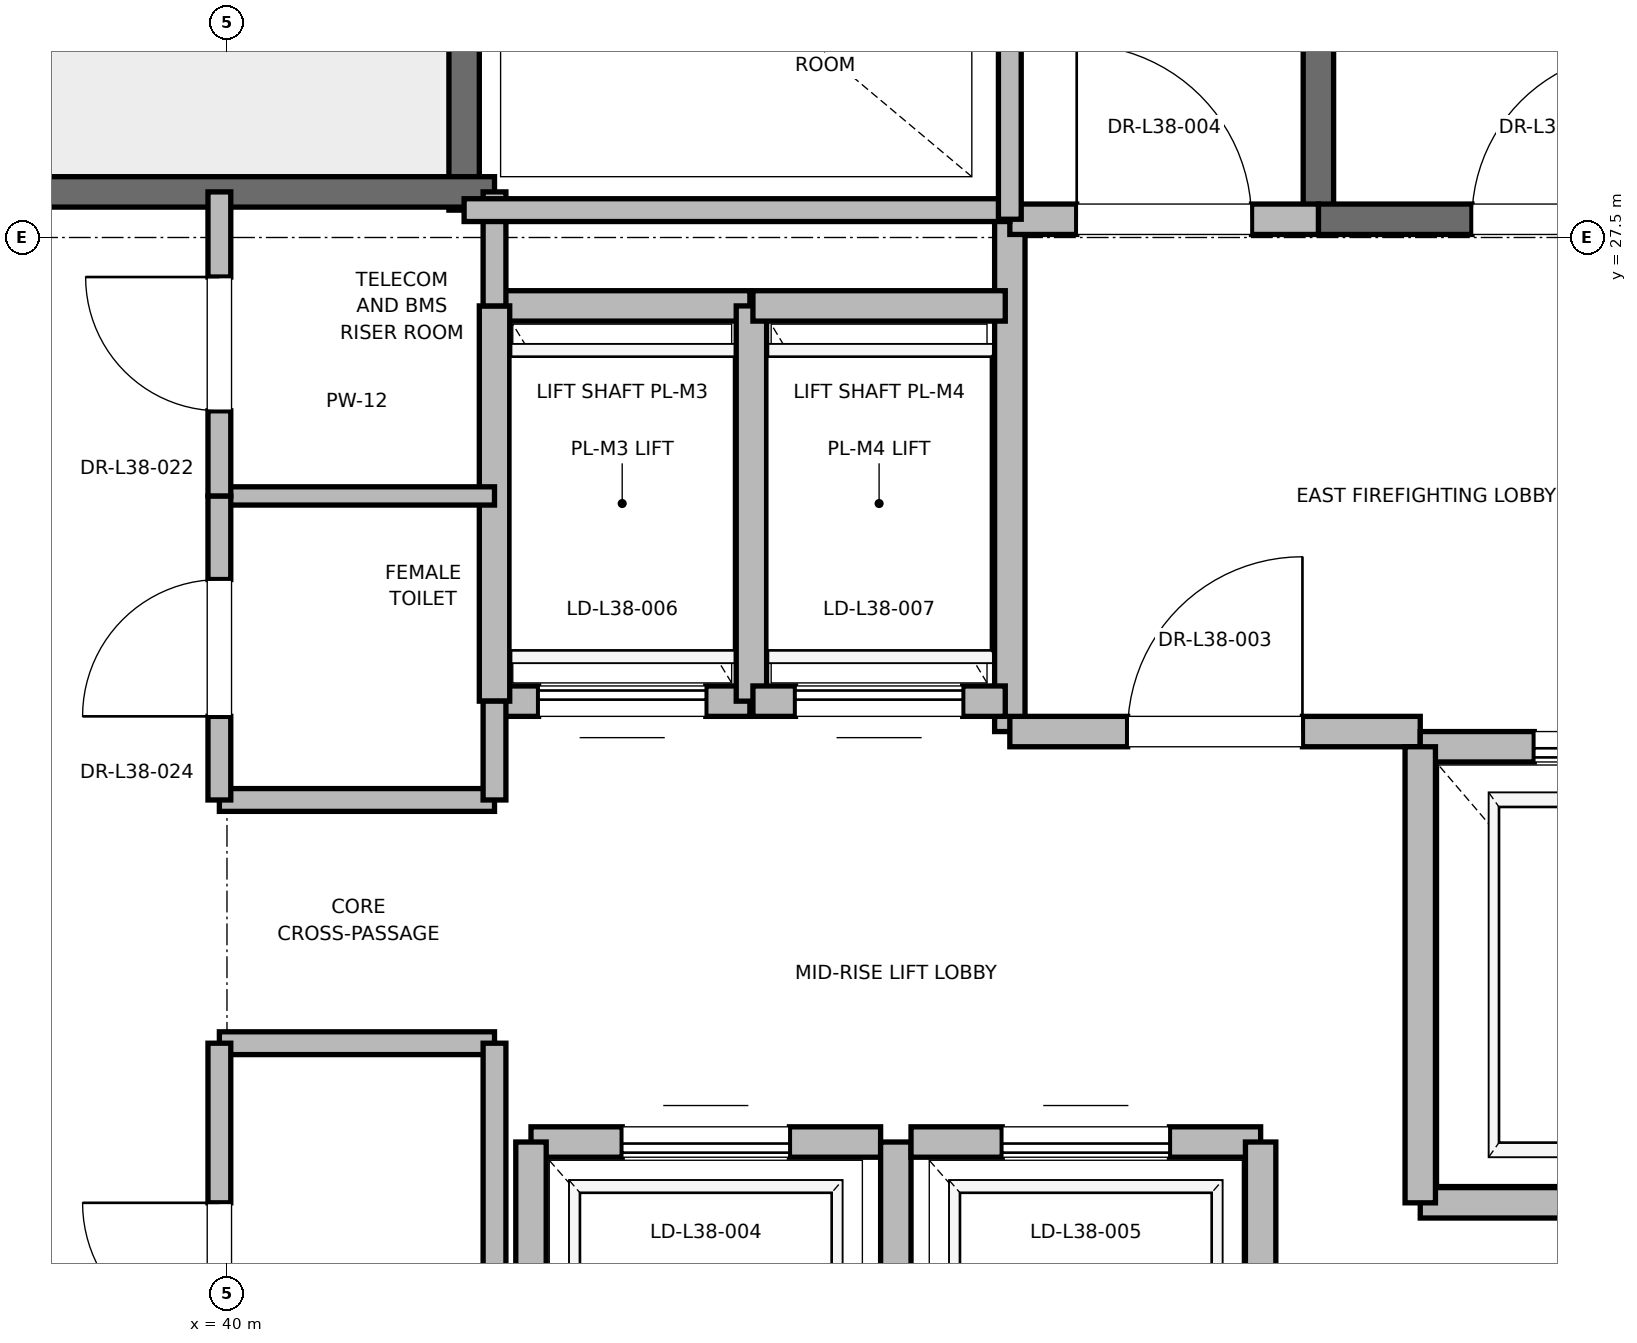
"""IFC4 building model, lengths in metres.
Left out: names, types, materials, properties, quantities, classifications, styles, units other than length and angle.
Written with IfcOpenShell. Run it as: python <this file> out.ifc"""

import sys

from ifc_helpers import new_model, si_unit, direction, frame, frame_2d, origin, place, context, subcontext, project, spatial, rectangle, extrude, element, fill, save


model = new_model("IFC4")
c1 = context("Model", 3, precision=1e-05, world=origin(), true_north=direction((0.0, 1.0)))
c2 = subcontext(c1, "Body", "Model", "MODEL_VIEW")
j1 = project(units=[si_unit("LENGTHUNIT", "METRE"), si_unit("PLANEANGLEUNIT", "RADIAN")], contexts=[c1])
p1 = place(None, origin())
s1 = spatial("IfcSite", under=j1, at=p1, CompositionType="ELEMENT")
p2 = place(p1, origin())
s2 = spatial("IfcBuilding", under=s1, at=p2, CompositionType="ELEMENT")
p3 = place(p2, frame((0.0, 0.0, 164.4)))
s3 = spatial("IfcBuildingStorey", under=s2, at=p3, CompositionType="ELEMENT", Elevation=164.4)
p4 = place(p3, frame((47.18, 27.62, 0.0), z_axis=(0.0, 0.0, 1.0), x_axis=(0.0, 1.0, 0.0)))
e1 = element("IfcWall", 1, at=p4, inside=s3, PredefinedType="SOLIDWALL", context=c2, shape_type="SweptSolid", body=[
    extrude(rectangle(XDim=8.18, YDim=0.2, at=frame_2d((4.09, 0.0))), origin(), (0.0, 0.0, 1.0), 3.775),
])
p5 = place(p3, frame((47.18, 27.62, 0.0), z_axis=(0.0, 0.0, 1.0), x_axis=(1.0, 0.0, 0.0)))
e2 = element("IfcWall", 2, at=p5, inside=s3, PredefinedType="SOLIDWALL", context=c2, shape_type="SweptSolid", body=[
    extrude(rectangle(XDim=3.12, YDim=0.2, at=frame_2d((1.56, 0.0))), origin(), (0.0, 0.0, 1.0), 3.775),
])
p6 = place(p5, frame((1.01, 0.0, 0.0)))
e3 = element("IfcOpeningElement", 3, at=p6, cuts=e2, PredefinedType="OPENING", context=c2, shape_type="SweptSolid", body=[
    extrude(rectangle(XDim=1.1, YDim=2.15, at=frame_2d((0.55, 1.075))), frame((0.0, 0.1, 0.0), z_axis=(0.0, -1.0, 0.0), x_axis=(1.0, 0.0, 0.0)), (0.0, 0.0, 1.0), 0.2),
])
p7 = place(p3, frame((41.56, 27.68, 0.0), z_axis=(0.0, 0.0, 1.0), x_axis=(0.0, 1.0, 0.0)))
e4 = element("IfcWall", 4, at=p7, inside=s3, PredefinedType="SOLIDWALL", context=c2, shape_type="SweptSolid", body=[
    extrude(rectangle(XDim=8.57, YDim=0.2, at=frame_2d((4.285, 0.0))), origin(), (0.0, 0.0, 1.0), 3.775),
])
p8 = place(p3, frame((38.44, 27.8, 0.0), z_axis=(0.0, 0.0, 1.0), x_axis=(1.0, 0.0, 0.0)))
e5 = element("IfcWall", 5, at=p8, inside=s3, PredefinedType="SOLIDWALL", context=c2, shape_type="SweptSolid", body=[
    extrude(rectangle(XDim=3.32, YDim=0.2, at=frame_2d((1.66, 0.0))), origin(), (0.0, 0.0, 1.0), 3.775),
])
p9 = place(p3, frame((45.15, 24.25, 0.0), z_axis=(0.0, 0.0, 1.0), x_axis=(0.0, 1.0, 0.0)))
e6 = element("IfcWall", 6, at=p9, inside=s3, PredefinedType="PARTITIONING", context=c2, shape_type="SweptSolid", body=[
    extrude(rectangle(XDim=3.37, YDim=0.2, at=frame_2d((1.685, 0.0))), origin(), (0.0, 0.0, 1.0), 3.775),
])
p10 = place(p3, frame((45.15, 24.25, 0.0), z_axis=(0.0, 0.0, 1.0), x_axis=(1.0, 0.0, 0.0)))
e7 = element("IfcWall", 7, at=p10, inside=s3, PredefinedType="PARTITIONING", context=c2, shape_type="SweptSolid", body=[
    extrude(rectangle(XDim=2.7, YDim=0.2, at=frame_2d((1.35, 0.0))), origin(), (0.0, 0.0, 1.0), 3.775),
])
p11 = place(p10, frame((0.775, 0.0, 0.0)))
e8 = element("IfcOpeningElement", 8, at=p11, cuts=e7, PredefinedType="OPENING", context=c2, shape_type="SweptSolid", body=[
    extrude(rectangle(XDim=1.15, YDim=2.2, at=frame_2d((0.575, 1.1))), frame((0.0, 0.1, 0.0), z_axis=(0.0, -1.0, 0.0), x_axis=(1.0, 0.0, 0.0)), (0.0, 0.0, 1.0), 0.2),
])
p12 = place(p3, frame((45.15, 27.62, 0.0), z_axis=(0.0, 0.0, 1.0), x_axis=(1.0, 0.0, 0.0)))
e9 = element("IfcWall", 9, at=p12, inside=s3, PredefinedType="PARTITIONING", context=c2, shape_type="SweptSolid", body=[
    extrude(rectangle(XDim=2.03, YDim=0.2, at=frame_2d((1.015, 0.0))), origin(), (0.0, 0.0, 1.0), 3.775),
])
p13 = place(p12, frame((0.44, 0.0, 0.0)))
e10 = element("IfcOpeningElement", 10, at=p13, cuts=e9, PredefinedType="OPENING", context=c2, shape_type="SweptSolid", body=[
    extrude(rectangle(XDim=1.15, YDim=2.2, at=frame_2d((0.575, 1.1))), frame((0.0, 0.1, 0.0), z_axis=(0.0, -1.0, 0.0), x_axis=(1.0, 0.0, 0.0)), (0.0, 0.0, 1.0), 0.2),
])
p14 = place(p3, frame((47.85, 21.15, 0.0), z_axis=(0.0, 0.0, 1.0), x_axis=(1.0, 0.0, 0.0)))
e11 = element("IfcWall", 11, at=p14, inside=s3, PredefinedType="SOLIDWALL", context=c2, shape_type="SweptSolid", body=[
    extrude(rectangle(XDim=2.6, YDim=0.2, at=frame_2d((1.3, 0.0))), origin(), (0.0, 0.0, 1.0), 3.775),
])
p15 = place(p3, frame((50.45, 24.15, 0.0), z_axis=(0.0, 0.0, 1.0), x_axis=(-1.0, 0.0, 0.0)))
e12 = element("IfcWall", 12, at=p15, inside=s3, PredefinedType="SOLIDWALL", context=c2, shape_type="SweptSolid", body=[
    extrude(rectangle(XDim=2.6, YDim=0.2, at=frame_2d((1.3, 0.0))), origin(), (0.0, 0.0, 1.0), 2.755),
])
p16 = place(p15, frame((0.75, 0.0, 0.0)))
e13 = element("IfcOpeningElement", 13, at=p16, cuts=e12, PredefinedType="OPENING", context=c2, shape_type="SweptSolid", body=[
    extrude(rectangle(XDim=1.1, YDim=2.2, at=frame_2d((0.55, 1.1))), frame((0.0, 0.1, 0.0), z_axis=(0.0, -1.0, 0.0), x_axis=(1.0, 0.0, 0.0)), (0.0, 0.0, 1.0), 0.2),
])
p17 = place(p3, frame((47.85, 24.15, 0.0), z_axis=(0.0, 0.0, 1.0), x_axis=(0.0, -1.0, 0.0)))
e14 = element("IfcWall", 14, at=p17, inside=s3, PredefinedType="SOLIDWALL", context=c2, shape_type="SweptSolid", body=[
    extrude(rectangle(XDim=3.0, YDim=0.2, at=frame_2d((1.5, 0.0))), origin(), (0.0, 0.0, 1.0), 3.775),
])
p18 = place(p3, frame((44.3, 21.55, 0.0), z_axis=(0.0, 0.0, 1.0), x_axis=(-1.0, 0.0, 0.0)))
e15 = element("IfcWall", 15, at=p18, inside=s3, PredefinedType="SOLIDWALL", context=c2, shape_type="SweptSolid", body=[
    extrude(rectangle(XDim=2.3, YDim=0.2, at=frame_2d((1.15, 0.0))), origin(), (0.0, 0.0, 1.0), 3.775),
])
p19 = place(p18, frame((0.6, 0.0, 0.0)))
e16 = element("IfcOpeningElement", 16, at=p19, cuts=e15, PredefinedType="OPENING", context=c2, shape_type="SweptSolid", body=[
    extrude(rectangle(XDim=1.1, YDim=2.2, at=frame_2d((0.55, 1.1))), frame((0.0, 0.1, 0.0), z_axis=(0.0, -1.0, 0.0), x_axis=(1.0, 0.0, 0.0)), (0.0, 0.0, 1.0), 0.2),
])
p20 = place(p3, frame((42.0, 21.55, 0.0), z_axis=(0.0, 0.0, 1.0), x_axis=(0.0, -1.0, 0.0)))
e17 = element("IfcWall", 17, at=p20, inside=s3, PredefinedType="SOLIDWALL", context=c2, shape_type="SweptSolid", body=[
    extrude(rectangle(XDim=2.6, YDim=0.2, at=frame_2d((1.3, 0.0))), origin(), (0.0, 0.0, 1.0), 2.755),
])
p21 = place(p3, frame((44.4, 18.95, 0.0), z_axis=(0.0, 0.0, 1.0), x_axis=(0.0, 1.0, 0.0)))
e18 = element("IfcWall", 18, at=p21, inside=s3, PredefinedType="SOLIDWALL", context=c2, shape_type="SweptSolid", body=[
    extrude(rectangle(XDim=2.6, YDim=0.2, at=frame_2d((1.3, 0.0))), origin(), (0.0, 0.0, 1.0), 3.775),
])
p22 = place(p3, frame((46.8, 21.55, 0.0), z_axis=(0.0, 0.0, 1.0), x_axis=(-1.0, 0.0, 0.0)))
e19 = element("IfcWall", 19, at=p22, inside=s3, PredefinedType="SOLIDWALL", context=c2, shape_type="SweptSolid", body=[
    extrude(rectangle(XDim=2.3, YDim=0.2, at=frame_2d((1.15, 0.0))), origin(), (0.0, 0.0, 1.0), 3.775),
])
p23 = place(p22, frame((0.6, 0.0, 0.0)))
e20 = element("IfcOpeningElement", 20, at=p23, cuts=e19, PredefinedType="OPENING", context=c2, shape_type="SweptSolid", body=[
    extrude(rectangle(XDim=1.1, YDim=2.2, at=frame_2d((0.55, 1.1))), frame((0.0, 0.1, 0.0), z_axis=(0.0, -1.0, 0.0), x_axis=(1.0, 0.0, 0.0)), (0.0, 0.0, 1.0), 0.2),
])
p24 = place(p3, frame((46.8, 18.95, 0.0), z_axis=(0.0, 0.0, 1.0), x_axis=(0.0, 1.0, 0.0)))
e21 = element("IfcWall", 21, at=p24, inside=s3, PredefinedType="SOLIDWALL", context=c2, shape_type="SweptSolid", body=[
    extrude(rectangle(XDim=2.6, YDim=0.2, at=frame_2d((1.3, 0.0))), origin(), (0.0, 0.0, 1.0), 3.775),
])
p25 = place(p3, frame((41.76, 24.45, 0.0), z_axis=(0.0, 0.0, 1.0), x_axis=(1.0, 0.0, 0.0)))
e22 = element("IfcWall", 22, at=p25, inside=s3, PredefinedType="SOLIDWALL", context=c2, shape_type="SweptSolid", body=[
    extrude(rectangle(XDim=1.68, YDim=0.2, at=frame_2d((0.84, 0.0))), origin(), (0.0, 0.0, 1.0), 3.775),
])
p26 = place(p25, frame((0.29, 0.0, 0.0)))
e23 = element("IfcOpeningElement", 23, at=p26, cuts=e22, PredefinedType="OPENING", context=c2, shape_type="SweptSolid", body=[
    extrude(rectangle(XDim=1.1, YDim=2.2, at=frame_2d((0.55, 1.1))), frame((0.0, 0.1, 0.0), z_axis=(0.0, -1.0, 0.0), x_axis=(1.0, 0.0, 0.0)), (0.0, 0.0, 1.0), 0.2),
])
p27 = place(p3, frame((43.44, 27.05, 0.0), z_axis=(0.0, 0.0, 1.0), x_axis=(-1.0, 0.0, 0.0)))
e24 = element("IfcWall", 24, at=p27, inside=s3, PredefinedType="SOLIDWALL", context=c2, shape_type="SweptSolid", body=[
    extrude(rectangle(XDim=1.68, YDim=0.2, at=frame_2d((0.84, 0.0))), origin(), (0.0, 0.0, 1.0), 3.775),
])
for number, where, z_axis, x_axis in (
    (25, (41.76, 27.05, 0.0), (0.0, 0.0, 1.0), (0.0, -1.0, 0.0)),
    (26, (43.45, 24.45, 0.0), (0.0, 0.0, 1.0), (0.0, 1.0, 0.0)),
):
    element("IfcWall", number, at=place(p3, frame(where, z_axis=z_axis, x_axis=x_axis)), inside=s3, PredefinedType="SOLIDWALL", context=c2, shape_type="SweptSolid", body=[
        extrude(rectangle(XDim=2.6, YDim=0.2, at=frame_2d((1.3, 0.0))), origin(), (0.0, 0.0, 1.0), 3.775),
    ])
p28 = place(p3, frame((43.46, 24.45, 0.0), z_axis=(0.0, 0.0, 1.0), x_axis=(1.0, 0.0, 0.0)))
e27 = element("IfcWall", 27, at=p28, inside=s3, PredefinedType="SOLIDWALL", context=c2, shape_type="SweptSolid", body=[
    extrude(rectangle(XDim=1.66, YDim=0.2, at=frame_2d((0.83, 0.0))), origin(), (0.0, 0.0, 1.0), 3.775),
])
p29 = place(p28, frame((0.28, 0.0, 0.0)))
e28 = element("IfcOpeningElement", 28, at=p29, cuts=e27, PredefinedType="OPENING", context=c2, shape_type="SweptSolid", body=[
    extrude(rectangle(XDim=1.1, YDim=2.2, at=frame_2d((0.55, 1.1))), frame((0.0, 0.1, 0.0), z_axis=(0.0, -1.0, 0.0), x_axis=(1.0, 0.0, 0.0)), (0.0, 0.0, 1.0), 0.2),
])
p30 = place(p3, frame((45.12, 27.05, 0.0), z_axis=(0.0, 0.0, 1.0), x_axis=(-1.0, 0.0, 0.0)))
e29 = element("IfcWall", 29, at=p30, inside=s3, PredefinedType="SOLIDWALL", context=c2, shape_type="SweptSolid", body=[
    extrude(rectangle(XDim=1.66, YDim=0.2, at=frame_2d((0.83, 0.0))), origin(), (0.0, 0.0, 1.0), 3.775),
])
for number, where, z_axis, x_axis in (
    (30, (39.95, 22.2, 0.0), (0.0, 0.0, 1.0), (1.0, 0.0, 0.0)),
    (31, (39.95, 23.8, 0.0), (0.0, 0.0, 1.0), (1.0, 0.0, 0.0)),
):
    element("IfcWall", number, at=place(p3, frame(where, z_axis=z_axis, x_axis=x_axis)), inside=s3, PredefinedType="PARTITIONING", context=c2, shape_type="SweptSolid", body=[
        extrude(rectangle(XDim=1.81, YDim=0.15, at=frame_2d((0.905, 0.0))), origin(), (0.0, 0.0, 1.0), 2.85),
    ])
p31 = place(p3, frame((39.95, 25.8, 0.0), z_axis=(0.0, 0.0, 1.0), x_axis=(1.0, 0.0, 0.0)))
e32 = element("IfcWall", 32, at=p31, inside=s3, PredefinedType="PARTITIONING", context=c2, shape_type="SweptSolid", body=[
    extrude(rectangle(XDim=1.81, YDim=0.12, at=frame_2d((0.905, 0.0))), origin(), (0.0, 0.0, 1.0), 2.85),
])
p32 = place(p3, frame((41.76, 18.6, 0.0), z_axis=(0.0, 0.0, 1.0), x_axis=(0.0, 1.0, 0.0)))
e33 = element("IfcWall", 33, at=p32, inside=s3, PredefinedType="PARTITIONING", context=c2, shape_type="SweptSolid", body=[
    extrude(rectangle(XDim=3.6, YDim=0.15, at=frame_2d((1.8, 0.0))), origin(), (0.0, 0.0, 1.0), 2.755),
])
p33 = place(p3, frame((41.76, 23.8, 0.0), z_axis=(0.0, 0.0, 1.0), x_axis=(0.0, 1.0, 0.0)))
e34 = element("IfcWall", 34, at=p33, inside=s3, PredefinedType="PARTITIONING", context=c2, shape_type="SweptSolid", body=[
    extrude(rectangle(XDim=0.65, YDim=0.15, at=frame_2d((0.325, 0.0))), origin(), (0.0, 0.0, 1.0), 2.85),
])
p34 = place(p3, frame((41.76, 27.05, 0.0), z_axis=(0.0, 0.0, 1.0), x_axis=(0.0, 1.0, 0.0)))
e35 = element("IfcWall", 35, at=p34, inside=s3, PredefinedType="PARTITIONING", context=c2, shape_type="SweptSolid", body=[
    extrude(rectangle(XDim=0.75, YDim=0.15, at=frame_2d((0.375, 0.0))), origin(), (0.0, 0.0, 1.0), 2.85),
])
p35 = place(p3, frame((39.95, 19.2, 0.0), z_axis=(0.0, 0.0, 1.0), x_axis=(0.0, 1.0, 0.0)))
e36 = element("IfcWall", 36, at=p35, inside=s3, PredefinedType="PARTITIONING", context=c2, shape_type="SweptSolid", body=[
    extrude(rectangle(XDim=3.0, YDim=0.15, at=frame_2d((1.5, 0.0))), origin(), (0.0, 0.0, 1.0), 2.85),
])
p36 = place(p35, frame((1.05, 0.0, 0.0)))
e37 = element("IfcOpeningElement", 37, at=p36, cuts=e36, PredefinedType="OPENING", context=c2, shape_type="SweptSolid", body=[
    extrude(rectangle(XDim=0.9, YDim=2.1, at=frame_2d((0.45, 1.05))), frame((0.0, 0.075, 0.0), z_axis=(0.0, -1.0, 0.0), x_axis=(1.0, 0.0, 0.0)), (0.0, 0.0, 1.0), 0.15),
])
p37 = place(p3, frame((39.95, 23.8, 0.0), z_axis=(0.0, 0.0, 1.0), x_axis=(0.0, 1.0, 0.0)))
e38 = element("IfcWall", 38, at=p37, inside=s3, PredefinedType="PARTITIONING", context=c2, shape_type="SweptSolid", body=[
    extrude(rectangle(XDim=2.0, YDim=0.15, at=frame_2d((1.0, 0.0))), origin(), (0.0, 0.0, 1.0), 2.85),
])
p38 = place(p37, frame((0.55, 0.0, 0.0)))
e39 = element("IfcOpeningElement", 39, at=p38, cuts=e38, PredefinedType="OPENING", context=c2, shape_type="SweptSolid", body=[
    extrude(rectangle(XDim=0.9, YDim=2.1, at=frame_2d((0.45, 1.05))), frame((0.0, 0.075, 0.0), z_axis=(0.0, -1.0, 0.0), x_axis=(1.0, 0.0, 0.0)), (0.0, 0.0, 1.0), 0.15),
])
p39 = place(p3, frame((39.95, 25.8, 0.0), z_axis=(0.0, 0.0, 1.0), x_axis=(0.0, 1.0, 0.0)))
e40 = element("IfcWall", 40, at=p39, inside=s3, PredefinedType="PARTITIONING", context=c2, shape_type="SweptSolid", body=[
    extrude(rectangle(XDim=2.0, YDim=0.15, at=frame_2d((1.0, 0.0))), origin(), (0.0, 0.0, 1.0), 2.85),
])
p40 = place(p39, frame((0.56, 0.0, 0.0)))
e41 = element("IfcOpeningElement", 41, at=p40, cuts=e40, PredefinedType="OPENING", context=c2, shape_type="SweptSolid", body=[
    extrude(rectangle(XDim=0.88, YDim=2.1, at=frame_2d((0.44, 1.05))), frame((0.0, 0.075, 0.0), z_axis=(0.0, -1.0, 0.0), x_axis=(1.0, 0.0, 0.0)), (0.0, 0.0, 1.0), 0.15),
])
p41 = place(p3, frame((41.56, 27.68, 0.0), z_axis=(0.0, 0.0, 1.0), x_axis=(1.0, 0.0, 0.0)))
e42 = element("IfcWall", 42, at=p41, inside=s3, PredefinedType="PARTITIONING", context=c2, shape_type="SweptSolid", body=[
    extrude(rectangle(XDim=3.59, YDim=0.15, at=frame_2d((1.795, 0.0))), origin(), (0.0, 0.0, 1.0), 2.85),
])
p42 = place(p3, frame((45.15, 27.62, 0.0), z_axis=(0.0, 0.0, 1.0), x_axis=(0.0, 1.0, 0.0)))
e43 = element("IfcWall", 43, at=p42, inside=s3, PredefinedType="PARTITIONING", context=c2, shape_type="SweptSolid", body=[
    extrude(rectangle(XDim=3.1, YDim=0.15, at=frame_2d((1.55, 0.0))), origin(), (0.0, 0.0, 1.0), 2.85),
])
p43 = place(p6, origin())
e44 = element("IfcDoor", 44, at=p43, inside=s3, OperationType="SINGLE_SWING_RIGHT", PredefinedType="DOOR", context=c2, shape_type="SweptSolid", body=[
    extrude(rectangle(XDim=1.1, YDim=2.15, at=frame_2d((0.55, 1.075))), frame((0.0, 0.025, 0.0), z_axis=(0.0, -1.0, 0.0), x_axis=(1.0, 0.0, 0.0)), (0.0, 0.0, 1.0), 0.05),
])
fill(e3, e44)
p44 = place(p11, origin())
e45 = element("IfcDoor", 45, at=p44, inside=s3, OperationType="SINGLE_SWING_RIGHT", PredefinedType="DOOR", context=c2, shape_type="SweptSolid", body=[
    extrude(rectangle(XDim=1.15, YDim=2.2, at=frame_2d((0.575, 1.1))), frame((0.0, 0.025, 0.0), z_axis=(0.0, -1.0, 0.0), x_axis=(1.0, 0.0, 0.0)), (0.0, 0.0, 1.0), 0.05),
])
fill(e8, e45)
p45 = place(p13, origin())
e46 = element("IfcDoor", 46, at=p45, inside=s3, OperationType="SINGLE_SWING_LEFT", PredefinedType="DOOR", context=c2, shape_type="SweptSolid", body=[
    extrude(rectangle(XDim=1.15, YDim=2.2, at=frame_2d((0.575, 1.1))), frame((0.0, 0.025, 0.0), z_axis=(0.0, -1.0, 0.0), x_axis=(1.0, 0.0, 0.0)), (0.0, 0.0, 1.0), 0.05),
])
fill(e10, e46)
p46 = place(p16, origin())
e47 = element("IfcDoor", 47, at=p46, inside=s3, OperationType="SLIDING_TO_RIGHT", PredefinedType="DOOR", context=c2, shape_type="SweptSolid", body=[
    extrude(rectangle(XDim=1.1, YDim=2.2, at=frame_2d((0.55, 1.1))), frame((0.0, 0.025, 0.0), z_axis=(0.0, -1.0, 0.0), x_axis=(1.0, 0.0, 0.0)), (0.0, 0.0, 1.0), 0.05),
])
fill(e13, e47)
p47 = place(p19, origin())
e48 = element("IfcDoor", 48, at=p47, inside=s3, OperationType="SLIDING_TO_RIGHT", PredefinedType="DOOR", context=c2, shape_type="SweptSolid", body=[
    extrude(rectangle(XDim=1.1, YDim=2.2, at=frame_2d((0.55, 1.1))), frame((0.0, 0.025, 0.0), z_axis=(0.0, -1.0, 0.0), x_axis=(1.0, 0.0, 0.0)), (0.0, 0.0, 1.0), 0.05),
])
fill(e16, e48)
p48 = place(p23, origin())
e49 = element("IfcDoor", 49, at=p48, inside=s3, OperationType="SLIDING_TO_RIGHT", PredefinedType="DOOR", context=c2, shape_type="SweptSolid", body=[
    extrude(rectangle(XDim=1.1, YDim=2.2, at=frame_2d((0.55, 1.1))), frame((0.0, 0.025, 0.0), z_axis=(0.0, -1.0, 0.0), x_axis=(1.0, 0.0, 0.0)), (0.0, 0.0, 1.0), 0.05),
])
fill(e20, e49)
p49 = place(p26, origin())
e50 = element("IfcDoor", 50, at=p49, inside=s3, OperationType="SLIDING_TO_RIGHT", PredefinedType="DOOR", context=c2, shape_type="SweptSolid", body=[
    extrude(rectangle(XDim=1.1, YDim=2.2, at=frame_2d((0.55, 1.1))), frame((0.0, 0.025, 0.0), z_axis=(0.0, -1.0, 0.0), x_axis=(1.0, 0.0, 0.0)), (0.0, 0.0, 1.0), 0.05),
])
fill(e23, e50)
p50 = place(p29, origin())
e51 = element("IfcDoor", 51, at=p50, inside=s3, OperationType="SLIDING_TO_RIGHT", PredefinedType="DOOR", context=c2, shape_type="SweptSolid", body=[
    extrude(rectangle(XDim=1.1, YDim=2.2, at=frame_2d((0.55, 1.1))), frame((0.0, 0.025, 0.0), z_axis=(0.0, -1.0, 0.0), x_axis=(1.0, 0.0, 0.0)), (0.0, 0.0, 1.0), 0.05),
])
fill(e28, e51)
p51 = place(p36, origin())
e52 = element("IfcDoor", 52, at=p51, inside=s3, OperationType="SINGLE_SWING_RIGHT", PredefinedType="DOOR", context=c2, shape_type="SweptSolid", body=[
    extrude(rectangle(XDim=0.9, YDim=2.1, at=frame_2d((0.45, 1.05))), frame((0.0, 0.025, 0.0), z_axis=(0.0, -1.0, 0.0), x_axis=(1.0, 0.0, 0.0)), (0.0, 0.0, 1.0), 0.05),
])
fill(e37, e52)
p52 = place(p38, origin())
e53 = element("IfcDoor", 53, at=p52, inside=s3, OperationType="SINGLE_SWING_LEFT", PredefinedType="DOOR", context=c2, shape_type="SweptSolid", body=[
    extrude(rectangle(XDim=0.9, YDim=2.1, at=frame_2d((0.45, 1.05))), frame((0.0, 0.025, 0.0), z_axis=(0.0, -1.0, 0.0), x_axis=(1.0, 0.0, 0.0)), (0.0, 0.0, 1.0), 0.05),
])
fill(e39, e53)
p53 = place(p40, origin())
e54 = element("IfcDoor", 54, at=p53, inside=s3, OperationType="SINGLE_SWING_RIGHT", PredefinedType="DOOR", context=c2, shape_type="SweptSolid", body=[
    extrude(rectangle(XDim=0.88, YDim=2.1, at=frame_2d((0.44, 1.05))), frame((0.0, 0.025, 0.0), z_axis=(0.0, -1.0, 0.0), x_axis=(1.0, 0.0, 0.0)), (0.0, 0.0, 1.0), 0.05),
])
fill(e41, e54)
save(model, sys.argv[1])
